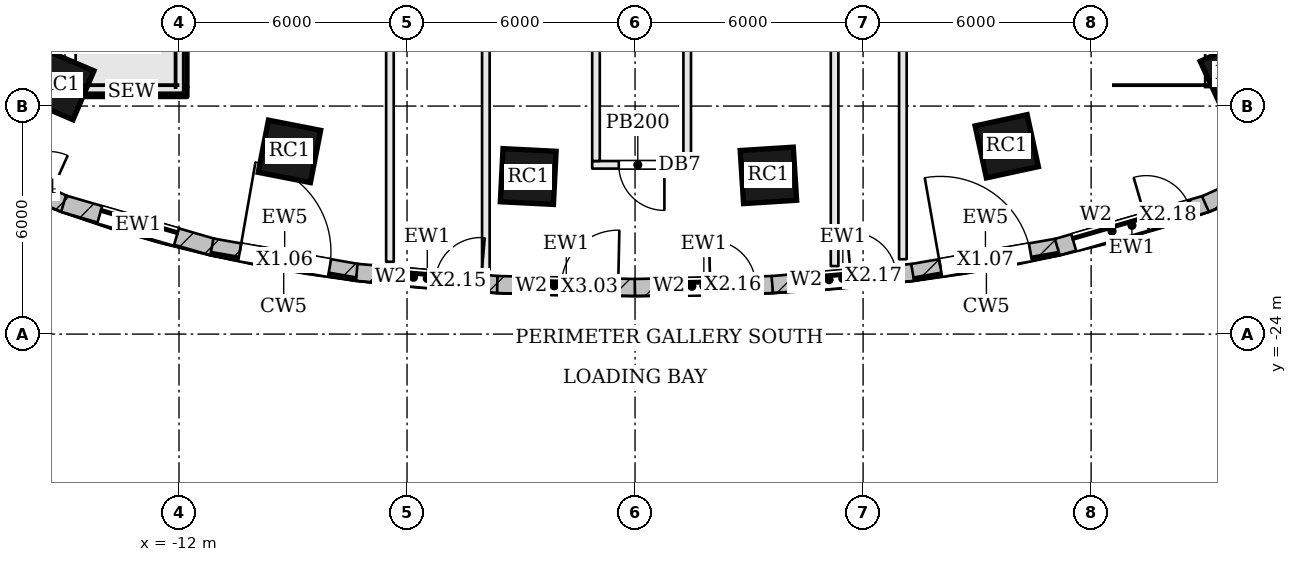
"""IFC4 building model, lengths in metres.
Left out: names, types, materials, properties, quantities, classifications, styles, units other than length and angle.
Written with IfcOpenShell. Run it as: python <this file> out.ifc"""

import sys

from ifc_helpers import new_model, si_unit, direction, frame, frame_2d, origin, origin_2d, place, context, subcontext, project, spatial, rectangle, extrude, element, fill, save


model = new_model("IFC4")
c1 = context("Model", 3, precision=1e-05, world=origin(), true_north=direction((0.0, 1.0)))
c2 = subcontext(c1, "Body", "Model", "MODEL_VIEW")
j1 = project(units=[si_unit("LENGTHUNIT", "METRE"), si_unit("PLANEANGLEUNIT", "RADIAN")], contexts=[c1])
p1 = place(None, origin())
s1 = spatial("IfcSite", under=j1, at=p1, CompositionType="ELEMENT")
p2 = place(p1, origin())
s2 = spatial("IfcBuilding", under=s1, at=p2, CompositionType="ELEMENT")
p3 = place(p2, origin())
s3 = spatial("IfcBuildingStorey", under=s2, at=p3, CompositionType="ELEMENT", Elevation=0.0)
for number, where, z_axis, x_axis in (
    (1, (-15.157, -17.441, 0.0), (0.0, 0.0, 1.0), (0.919, -0.394, 0.0)),
    (2, (-9.094, -19.192, 0.0), (0.0, 0.0, 1.0), (0.981, -0.192, 0.0)),
    (3, (-2.811, -19.854, 0.0), (0.0, 0.0, 1.0), (0.999, -0.05, 0.0)),
    (4, (3.509, -19.824, 0.0), (0.0, 0.0, 1.0), (0.998, 0.063, 0.0)),
    (5, (9.78, -19.058, 0.0), (0.0, 0.0, 1.0), (0.977, 0.211, 0.0)),
    (6, (15.799, -17.165, 0.0), (0.0, 0.0, 1.0), (0.908, 0.419, 0.0)),
):
    element("IfcColumn", number, at=place(p3, frame(where, z_axis=z_axis, x_axis=x_axis)), inside=s3, PredefinedType="COLUMN", context=c2, shape_type="SweptSolid", body=[
        extrude(rectangle(XDim=1.4, YDim=1.4, at=origin_2d()), origin(), (0.0, 0.0, 1.0), 7.2),
    ])
p4 = place(p3, frame((-18.934, -18.821, 0.0), z_axis=(0.0, 0.0, 1.0), x_axis=(0.912571415594, -0.408917365052, 0.0)))
e7 = element("IfcWall", 7, at=p4, inside=s3, PredefinedType="SOLIDWALL", context=c2, shape_type="SweptSolid", body=[
    extrude(rectangle(XDim=4.301, YDim=0.45, at=frame_2d((2.15, 0.0))), origin(), (0.0, 0.0, 1.0), 6.95),
])
p5 = place(p4, frame((0.45, 0.0, 0.9)))
e8 = element("IfcOpeningElement", 8, at=p5, cuts=e7, PredefinedType="OPENING", context=c2, shape_type="SweptSolid", body=[
    extrude(rectangle(XDim=2.1, YDim=5.0, at=frame_2d((1.05, 2.5))), frame((0.0, 0.235, 0.0), z_axis=(0.0, -1.0, 0.0), x_axis=(1.0, 0.0, 0.0)), (0.0, 0.0, 1.0), 0.47),
])
p6 = place(p4, frame((2.651, 0.0, 0.0)))
e9 = element("IfcOpeningElement", 9, at=p6, cuts=e7, PredefinedType="OPENING", context=c2, shape_type="SweptSolid", body=[
    extrude(rectangle(XDim=1.2, YDim=2.4, at=frame_2d((0.6, 1.2))), frame((0.0, 0.235, 0.0), z_axis=(0.0, -1.0, 0.0), x_axis=(1.0, 0.0, 0.0)), (0.0, 0.0, 1.0), 0.47),
])
p7 = place(p3, frame((-15.038, -20.569, 0.0), z_axis=(0.0, 0.0, 1.0), x_axis=(0.960186274122, -0.279360553743, 0.0)))
e10 = element("IfcWall", 10, at=p7, inside=s3, PredefinedType="SOLIDWALL", context=c2, shape_type="SweptSolid", body=[
    extrude(rectangle(XDim=4.091, YDim=0.45, at=frame_2d((2.045, 0.0))), origin(), (0.0, 0.0, 1.0), 6.95),
])
p8 = place(p7, frame((0.996, 0.0, 0.9)))
e11 = element("IfcOpeningElement", 11, at=p8, cuts=e10, PredefinedType="OPENING", context=c2, shape_type="SweptSolid", body=[
    extrude(rectangle(XDim=2.1, YDim=5.0, at=frame_2d((1.05, 2.5))), frame((0.0, 0.235, 0.0), z_axis=(0.0, -1.0, 0.0), x_axis=(1.0, 0.0, 0.0)), (0.0, 0.0, 1.0), 0.47),
])
p9 = place(p3, frame((-11.134, -21.706, 0.0), z_axis=(0.0, 0.0, 1.0), x_axis=(0.984947461591, -0.172853978566, 0.0)))
e12 = element("IfcWall", 12, at=p9, inside=s3, PredefinedType="SOLIDWALL", context=c2, shape_type="SweptSolid", body=[
    extrude(rectangle(XDim=3.888, YDim=0.45, at=frame_2d((1.944, 0.0))), origin(), (0.0, 0.0, 1.0), 3.55),
])
p10 = place(p9, frame((0.744, 0.0, 0.0)))
e13 = element("IfcOpeningElement", 13, at=p10, cuts=e12, PredefinedType="OPENING", context=c2, shape_type="SweptSolid", body=[
    extrude(rectangle(XDim=2.4, YDim=3.2, at=frame_2d((1.2, 1.6))), frame((0.0, 0.235, 0.0), z_axis=(0.0, -1.0, 0.0), x_axis=(1.0, 0.0, 0.0)), (0.0, 0.0, 1.0), 0.47),
])
p11 = place(p3, frame((-7.323, -22.376, 0.0), z_axis=(0.0, 0.0, 1.0), x_axis=(0.996259982326, -0.086406293838, 0.0)))
e14 = element("IfcWall", 14, at=p11, inside=s3, PredefinedType="SOLIDWALL", context=c2, shape_type="SweptSolid", body=[
    extrude(rectangle(XDim=3.727, YDim=0.45, at=frame_2d((1.863, 0.0))), origin(), (0.0, 0.0, 1.0), 6.95),
])
p12 = place(p11, frame((0.45, 0.0, 0.9)))
e15 = element("IfcOpeningElement", 15, at=p12, cuts=e14, PredefinedType="OPENING", context=c2, shape_type="SweptSolid", body=[
    extrude(rectangle(XDim=2.1, YDim=5.0, at=frame_2d((1.05, 2.5))), frame((0.0, 0.235, 0.0), z_axis=(0.0, -1.0, 0.0), x_axis=(1.0, 0.0, 0.0)), (0.0, 0.0, 1.0), 0.47),
])
p13 = place(p11, frame((2.077, 0.0, 0.0)))
e16 = element("IfcOpeningElement", 16, at=p13, cuts=e14, PredefinedType="OPENING", context=c2, shape_type="SweptSolid", body=[
    extrude(rectangle(XDim=1.2, YDim=2.4, at=frame_2d((0.6, 1.2))), frame((0.0, 0.235, 0.0), z_axis=(0.0, -1.0, 0.0), x_axis=(1.0, 0.0, 0.0)), (0.0, 0.0, 1.0), 0.47),
])
p14 = place(p3, frame((-3.625, -22.697, 0.0), z_axis=(0.0, 0.0, 1.0), x_axis=(0.999769941673, -0.0214490962, 0.0)))
e17 = element("IfcWall", 17, at=p14, inside=s3, PredefinedType="SOLIDWALL", context=c2, shape_type="SweptSolid", body=[
    extrude(rectangle(XDim=3.631, YDim=0.45, at=frame_2d((1.815, 0.0))), origin(), (0.0, 0.0, 1.0), 6.95),
])
p15 = place(p14, frame((0.45, 0.0, 0.9)))
e18 = element("IfcOpeningElement", 18, at=p15, cuts=e17, PredefinedType="OPENING", context=c2, shape_type="SweptSolid", body=[
    extrude(rectangle(XDim=2.1, YDim=5.0, at=frame_2d((1.05, 2.5))), frame((0.0, 0.235, 0.0), z_axis=(0.0, -1.0, 0.0), x_axis=(1.0, 0.0, 0.0)), (0.0, 0.0, 1.0), 0.47),
])
p16 = place(p14, frame((1.681, 0.0, 0.0)))
e19 = element("IfcOpeningElement", 19, at=p16, cuts=e17, PredefinedType="OPENING", context=c2, shape_type="SweptSolid", body=[
    extrude(rectangle(XDim=1.5, YDim=2.4, at=frame_2d((0.75, 1.2))), frame((0.0, 0.235, 0.0), z_axis=(0.0, -1.0, 0.0), x_axis=(1.0, 0.0, 0.0)), (0.0, 0.0, 1.0), 0.47),
])
p17 = place(p3, frame((-0.005, -22.775, 0.0), z_axis=(0.0, 0.0, 1.0), x_axis=(0.999769941673, 0.0214490962, 0.0)))
e20 = element("IfcWall", 20, at=p17, inside=s3, PredefinedType="SOLIDWALL", context=c2, shape_type="SweptSolid", body=[
    extrude(rectangle(XDim=3.631, YDim=0.45, at=frame_2d((1.815, 0.0))), origin(), (0.0, 0.0, 1.0), 6.95),
])
p18 = place(p17, frame((0.45, 0.0, 0.9)))
e21 = element("IfcOpeningElement", 21, at=p18, cuts=e20, PredefinedType="OPENING", context=c2, shape_type="SweptSolid", body=[
    extrude(rectangle(XDim=2.1, YDim=5.0, at=frame_2d((1.05, 2.5))), frame((0.0, 0.235, 0.0), z_axis=(0.0, -1.0, 0.0), x_axis=(1.0, 0.0, 0.0)), (0.0, 0.0, 1.0), 0.47),
])
p19 = place(p17, frame((1.981, 0.0, 0.0)))
e22 = element("IfcOpeningElement", 22, at=p19, cuts=e20, PredefinedType="OPENING", context=c2, shape_type="SweptSolid", body=[
    extrude(rectangle(XDim=1.2, YDim=2.4, at=frame_2d((0.6, 1.2))), frame((0.0, 0.235, 0.0), z_axis=(0.0, -1.0, 0.0), x_axis=(1.0, 0.0, 0.0)), (0.0, 0.0, 1.0), 0.47),
])
p20 = place(p3, frame((3.611, -22.698, 0.0), z_axis=(0.0, 0.0, 1.0), x_axis=(0.996259982326, 0.086406293838, 0.0)))
e23 = element("IfcWall", 23, at=p20, inside=s3, PredefinedType="SOLIDWALL", context=c2, shape_type="SweptSolid", body=[
    extrude(rectangle(XDim=3.727, YDim=0.45, at=frame_2d((1.863, 0.0))), origin(), (0.0, 0.0, 1.0), 6.95),
])
p21 = place(p20, frame((0.45, 0.0, 0.9)))
e24 = element("IfcOpeningElement", 24, at=p21, cuts=e23, PredefinedType="OPENING", context=c2, shape_type="SweptSolid", body=[
    extrude(rectangle(XDim=2.1, YDim=5.0, at=frame_2d((1.05, 2.5))), frame((0.0, 0.235, 0.0), z_axis=(0.0, -1.0, 0.0), x_axis=(1.0, 0.0, 0.0)), (0.0, 0.0, 1.0), 0.47),
])
p22 = place(p20, frame((2.077, 0.0, 0.0)))
e25 = element("IfcOpeningElement", 25, at=p22, cuts=e23, PredefinedType="OPENING", context=c2, shape_type="SweptSolid", body=[
    extrude(rectangle(XDim=1.2, YDim=2.4, at=frame_2d((0.6, 1.2))), frame((0.0, 0.235, 0.0), z_axis=(0.0, -1.0, 0.0), x_axis=(1.0, 0.0, 0.0)), (0.0, 0.0, 1.0), 0.47),
])
p23 = place(p3, frame((7.304, -22.378, 0.0), z_axis=(0.0, 0.0, 1.0), x_axis=(0.984947461591, 0.172853978566, 0.0)))
e26 = element("IfcWall", 26, at=p23, inside=s3, PredefinedType="SOLIDWALL", context=c2, shape_type="SweptSolid", body=[
    extrude(rectangle(XDim=3.888, YDim=0.45, at=frame_2d((1.944, 0.0))), origin(), (0.0, 0.0, 1.0), 3.55),
])
p24 = place(p23, frame((0.744, 0.0, 0.0)))
e27 = element("IfcOpeningElement", 27, at=p24, cuts=e26, PredefinedType="OPENING", context=c2, shape_type="SweptSolid", body=[
    extrude(rectangle(XDim=2.4, YDim=3.2, at=frame_2d((1.2, 1.6))), frame((0.0, 0.235, 0.0), z_axis=(0.0, -1.0, 0.0), x_axis=(1.0, 0.0, 0.0)), (0.0, 0.0, 1.0), 0.47),
])
p25 = place(p3, frame((11.11, -21.712, 0.0), z_axis=(0.0, 0.0, 1.0), x_axis=(0.960186274122, 0.279360553743, 0.0)))
e28 = element("IfcWall", 28, at=p25, inside=s3, PredefinedType="SOLIDWALL", context=c2, shape_type="SweptSolid", body=[
    extrude(rectangle(XDim=4.091, YDim=0.45, at=frame_2d((2.045, 0.0))), origin(), (0.0, 0.0, 1.0), 6.95),
])
p26 = place(p25, frame((0.45, 0.0, 0.9)))
e29 = element("IfcOpeningElement", 29, at=p26, cuts=e28, PredefinedType="OPENING", context=c2, shape_type="SweptSolid", body=[
    extrude(rectangle(XDim=2.1, YDim=5.0, at=frame_2d((1.05, 2.5))), frame((0.0, 0.235, 0.0), z_axis=(0.0, -1.0, 0.0), x_axis=(1.0, 0.0, 0.0)), (0.0, 0.0, 1.0), 0.47),
])
p27 = place(p25, frame((2.441, 0.0, 0.0)))
e30 = element("IfcOpeningElement", 30, at=p27, cuts=e28, PredefinedType="OPENING", context=c2, shape_type="SweptSolid", body=[
    extrude(rectangle(XDim=1.2, YDim=2.4, at=frame_2d((0.6, 1.2))), frame((0.0, 0.235, 0.0), z_axis=(0.0, -1.0, 0.0), x_axis=(1.0, 0.0, 0.0)), (0.0, 0.0, 1.0), 0.47),
])
p28 = place(p3, frame((15.009, -20.58, 0.0), z_axis=(0.0, 0.0, 1.0), x_axis=(0.912571415594, 0.408917365052, 0.0)))
e31 = element("IfcWall", 31, at=p28, inside=s3, PredefinedType="SOLIDWALL", context=c2, shape_type="SweptSolid", body=[
    extrude(rectangle(XDim=4.301, YDim=0.45, at=frame_2d((2.15, 0.0))), origin(), (0.0, 0.0, 1.0), 6.95),
])
p29 = place(p28, frame((1.101, 0.0, 0.9)))
e32 = element("IfcOpeningElement", 32, at=p29, cuts=e31, PredefinedType="OPENING", context=c2, shape_type="SweptSolid", body=[
    extrude(rectangle(XDim=2.1, YDim=5.0, at=frame_2d((1.05, 2.5))), frame((0.0, 0.235, 0.0), z_axis=(0.0, -1.0, 0.0), x_axis=(1.0, 0.0, 0.0)), (0.0, 0.0, 1.0), 0.47),
])
p30 = place(p3, frame((-3.926, -3.05, 0.0), z_axis=(0.0, 0.0, 1.0), x_axis=(0.0, -1.0, 0.0)))
e33 = element("IfcWall", 33, at=p30, inside=s3, PredefinedType="PARTITIONING", context=c2, shape_type="SweptSolid", body=[
    extrude(rectangle(XDim=19.252, YDim=0.2, at=frame_2d((9.626, 0.0))), origin(), (0.0, 0.0, 1.0), 6.23),
])
p31 = place(p30, frame((0.95, 0.0, 0.0)))
e34 = element("IfcOpeningElement", 34, at=p31, cuts=e33, PredefinedType="OPENING", context=c2, shape_type="SweptSolid", body=[
    extrude(rectangle(XDim=1.0, YDim=2.1, at=frame_2d((0.5, 1.05))), frame((0.0, 0.11, 0.0), z_axis=(0.0, -1.0, 0.0), x_axis=(1.0, 0.0, 0.0)), (0.0, 0.0, 1.0), 0.22),
])
p32 = place(p3, frame((-6.45, -22.097, 0.0), z_axis=(0.0, 0.0, 1.0), x_axis=(0.0, 1.0, 0.0)))
e35 = element("IfcWall", 35, at=p32, inside=s3, PredefinedType="PARTITIONING", context=c2, shape_type="SweptSolid", body=[
    extrude(rectangle(XDim=19.047, YDim=0.2, at=frame_2d((9.523, 0.0))), origin(), (0.0, 0.0, 1.0), 6.23),
])
p33 = place(p32, frame((17.097, 0.0, 0.0)))
e36 = element("IfcOpeningElement", 36, at=p33, cuts=e35, PredefinedType="OPENING", context=c2, shape_type="SweptSolid", body=[
    extrude(rectangle(XDim=1.0, YDim=2.1, at=frame_2d((0.5, 1.05))), frame((0.0, 0.11, 0.0), z_axis=(0.0, -1.0, 0.0), x_axis=(1.0, 0.0, 0.0)), (0.0, 0.0, 1.0), 0.22),
])
p34 = place(p3, frame((7.047, -3.05, 0.0), z_axis=(0.0, 0.0, 1.0), x_axis=(0.0, -1.0, 0.0)))
e37 = element("IfcWall", 37, at=p34, inside=s3, PredefinedType="PARTITIONING", context=c2, shape_type="SweptSolid", body=[
    extrude(rectangle(XDim=18.98, YDim=0.2, at=frame_2d((9.49, 0.0))), origin(), (0.0, 0.0, 1.0), 6.23),
])
p35 = place(p34, frame((0.95, 0.0, 0.0)))
e38 = element("IfcOpeningElement", 38, at=p35, cuts=e37, PredefinedType="OPENING", context=c2, shape_type="SweptSolid", body=[
    extrude(rectangle(XDim=1.0, YDim=2.1, at=frame_2d((0.5, 1.05))), frame((0.0, 0.11, 0.0), z_axis=(0.0, -1.0, 0.0), x_axis=(1.0, 0.0, 0.0)), (0.0, 0.0, 1.0), 0.22),
])
p36 = place(p3, frame((5.25, -22.21, 0.0), z_axis=(0.0, 0.0, 1.0), x_axis=(0.0, 1.0, 0.0)))
e39 = element("IfcWall", 39, at=p36, inside=s3, PredefinedType="PARTITIONING", context=c2, shape_type="SweptSolid", body=[
    extrude(rectangle(XDim=19.16, YDim=0.2, at=frame_2d((9.58, 0.0))), origin(), (0.0, 0.0, 1.0), 6.23),
])
p37 = place(p36, frame((17.21, 0.0, 0.0)))
e40 = element("IfcOpeningElement", 40, at=p37, cuts=e39, PredefinedType="OPENING", context=c2, shape_type="SweptSolid", body=[
    extrude(rectangle(XDim=1.0, YDim=2.1, at=frame_2d((0.5, 1.05))), frame((0.0, 0.11, 0.0), z_axis=(0.0, -1.0, 0.0), x_axis=(1.0, 0.0, 0.0)), (0.0, 0.0, 1.0), 0.22),
])
p38 = place(p3, frame((1.372, -6.1, 0.0), z_axis=(0.0, 0.0, 1.0), x_axis=(0.0, -1.0, 0.0)))
e41 = element("IfcWall", 41, at=p38, inside=s3, PredefinedType="PARTITIONING", context=c2, shape_type="SweptSolid", body=[
    extrude(rectangle(XDim=13.546, YDim=0.2, at=frame_2d((6.773, 0.0))), origin(), (0.0, 0.0, 1.0), 6.23),
])
p39 = place(p38, frame((5.717, 0.0, 0.0)))
e42 = element("IfcOpeningElement", 42, at=p39, cuts=e41, PredefinedType="OPENING", context=c2, shape_type="SweptSolid", body=[
    extrude(rectangle(XDim=1.2, YDim=2.1, at=frame_2d((0.6, 1.05))), frame((0.0, 0.11, 0.0), z_axis=(0.0, -1.0, 0.0), x_axis=(1.0, 0.0, 0.0)), (0.0, 0.0, 1.0), 0.22),
])
p40 = place(p3, frame((1.272, -19.546, 0.0), z_axis=(0.0, 0.0, 1.0), x_axis=(-1.0, 0.0, 0.0)))
e43 = element("IfcWall", 43, at=p40, inside=s3, PredefinedType="PARTITIONING", context=c2, shape_type="SweptSolid", body=[
    extrude(rectangle(XDim=2.4, YDim=0.2, at=frame_2d((1.2, 0.0))), origin(), (0.0, 0.0, 1.0), 6.23),
])
p41 = place(p40, frame((0.5, 0.0, 0.0)))
e44 = element("IfcOpeningElement", 44, at=p41, cuts=e43, PredefinedType="OPENING", context=c2, shape_type="SweptSolid", body=[
    extrude(rectangle(XDim=1.2, YDim=2.1, at=frame_2d((0.6, 1.05))), frame((0.0, 0.11, 0.0), z_axis=(0.0, -1.0, 0.0), x_axis=(1.0, 0.0, 0.0)), (0.0, 0.0, 1.0), 0.22),
])
p42 = place(p3, frame((-1.028, -19.446, 0.0), z_axis=(0.0, 0.0, 1.0), x_axis=(0.0, 1.0, 0.0)))
e45 = element("IfcWall", 45, at=p42, inside=s3, PredefinedType="PARTITIONING", context=c2, shape_type="SweptSolid", body=[
    extrude(rectangle(XDim=13.346, YDim=0.2, at=frame_2d((6.673, 0.0))), origin(), (0.0, 0.0, 1.0), 6.23),
])
p43 = place(p42, frame((6.423, 0.0, 0.0)))
e46 = element("IfcOpeningElement", 46, at=p43, cuts=e45, PredefinedType="OPENING", context=c2, shape_type="SweptSolid", body=[
    extrude(rectangle(XDim=1.2, YDim=2.1, at=frame_2d((0.6, 1.05))), frame((0.0, 0.11, 0.0), z_axis=(0.0, -1.0, 0.0), x_axis=(1.0, 0.0, 0.0)), (0.0, 0.0, 1.0), 0.22),
])
p44 = place(p3, frame((-11.915, -17.5, 0.0), z_axis=(0.0, 0.0, 1.0), x_axis=(0.0, 1.0, 0.0)))
e47 = element("IfcWall", 47, at=p44, inside=s3, PredefinedType="SOLIDWALL", context=c2, shape_type="SweptSolid", body=[
    extrude(rectangle(XDim=4.95, YDim=0.25, at=frame_2d((2.475, 0.0))), origin(), (0.0, 0.0, 1.0), 6.95),
])
p45 = place(p3, frame((-14.72, -17.625, 0.0), z_axis=(0.0, 0.0, 1.0), x_axis=(1.0, 0.0, 0.0)))
e48 = element("IfcWall", 48, at=p45, inside=s3, PredefinedType="SOLIDWALL", context=c2, shape_type="SweptSolid", body=[
    extrude(rectangle(XDim=2.93, YDim=0.25, at=frame_2d((1.465, 0.0))), origin(), (0.0, 0.0, 1.0), 6.95),
])
p46 = place(p8, origin())
e49 = element("IfcWindow", 49, at=p46, inside=s3, PartitioningType="SINGLE_PANEL", PredefinedType="WINDOW", context=c2, shape_type="SweptSolid", body=[
    extrude(rectangle(XDim=2.1, YDim=5.0, at=frame_2d((1.05, 2.5))), frame((0.0, 0.135, 0.0), z_axis=(0.0, -1.0, 0.0), x_axis=(1.0, 0.0, 0.0)), (0.0, 0.0, 1.0), 0.06),
])
fill(e11, e49)
p47 = place(p10, origin())
e50 = element("IfcDoor", 50, at=p47, inside=s3, OperationType="DOUBLE_DOOR_DOUBLE_SWING", PredefinedType="DOOR", context=c2, shape_type="SweptSolid", body=[
    extrude(rectangle(XDim=2.4, YDim=3.2, at=frame_2d((1.2, 1.6))), frame((0.0, 0.025, 0.0), z_axis=(0.0, -1.0, 0.0), x_axis=(1.0, 0.0, 0.0)), (0.0, 0.0, 1.0), 0.05),
])
fill(e13, e50)
p48 = place(p12, origin())
e51 = element("IfcWindow", 51, at=p48, inside=s3, PartitioningType="SINGLE_PANEL", PredefinedType="WINDOW", context=c2, shape_type="SweptSolid", body=[
    extrude(rectangle(XDim=2.1, YDim=5.0, at=frame_2d((1.05, 2.5))), frame((0.0, 0.135, 0.0), z_axis=(0.0, -1.0, 0.0), x_axis=(1.0, 0.0, 0.0)), (0.0, 0.0, 1.0), 0.06),
])
fill(e15, e51)
p49 = place(p13, frame((1.2, 0.0, 0.0), z_axis=(0.0, 0.0, 1.0), x_axis=(-1.0, 0.0, 0.0)))
e52 = element("IfcDoor", 52, at=p49, inside=s3, OperationType="SINGLE_SWING_RIGHT", PredefinedType="DOOR", context=c2, shape_type="SweptSolid", body=[
    extrude(rectangle(XDim=1.2, YDim=2.4, at=frame_2d((0.6, 1.2))), frame((0.0, 0.025, 0.0), z_axis=(0.0, -1.0, 0.0), x_axis=(1.0, 0.0, 0.0)), (0.0, 0.0, 1.0), 0.05),
])
fill(e16, e52)
p50 = place(p15, origin())
e53 = element("IfcWindow", 53, at=p50, inside=s3, PartitioningType="SINGLE_PANEL", PredefinedType="WINDOW", context=c2, shape_type="SweptSolid", body=[
    extrude(rectangle(XDim=2.1, YDim=5.0, at=frame_2d((1.05, 2.5))), frame((0.0, 0.135, 0.0), z_axis=(0.0, -1.0, 0.0), x_axis=(1.0, 0.0, 0.0)), (0.0, 0.0, 1.0), 0.06),
])
fill(e18, e53)
p51 = place(p16, frame((1.5, 0.0, 0.0), z_axis=(0.0, 0.0, 1.0), x_axis=(-1.0, 0.0, 0.0)))
e54 = element("IfcDoor", 54, at=p51, inside=s3, OperationType="SINGLE_SWING_RIGHT", PredefinedType="DOOR", context=c2, shape_type="SweptSolid", body=[
    extrude(rectangle(XDim=1.5, YDim=2.4, at=frame_2d((0.75, 1.2))), frame((0.0, 0.025, 0.0), z_axis=(0.0, -1.0, 0.0), x_axis=(1.0, 0.0, 0.0)), (0.0, 0.0, 1.0), 0.05),
])
fill(e19, e54)
p52 = place(p18, origin())
e55 = element("IfcWindow", 55, at=p52, inside=s3, PartitioningType="SINGLE_PANEL", PredefinedType="WINDOW", context=c2, shape_type="SweptSolid", body=[
    extrude(rectangle(XDim=2.1, YDim=5.0, at=frame_2d((1.05, 2.5))), frame((0.0, 0.135, 0.0), z_axis=(0.0, -1.0, 0.0), x_axis=(1.0, 0.0, 0.0)), (0.0, 0.0, 1.0), 0.06),
])
fill(e21, e55)
p53 = place(p19, frame((1.2, 0.0, 0.0), z_axis=(0.0, 0.0, 1.0), x_axis=(-1.0, 0.0, 0.0)))
e56 = element("IfcDoor", 56, at=p53, inside=s3, OperationType="SINGLE_SWING_LEFT", PredefinedType="DOOR", context=c2, shape_type="SweptSolid", body=[
    extrude(rectangle(XDim=1.2, YDim=2.4, at=frame_2d((0.6, 1.2))), frame((0.0, 0.025, 0.0), z_axis=(0.0, -1.0, 0.0), x_axis=(1.0, 0.0, 0.0)), (0.0, 0.0, 1.0), 0.05),
])
fill(e22, e56)
p54 = place(p21, origin())
e57 = element("IfcWindow", 57, at=p54, inside=s3, PartitioningType="SINGLE_PANEL", PredefinedType="WINDOW", context=c2, shape_type="SweptSolid", body=[
    extrude(rectangle(XDim=2.1, YDim=5.0, at=frame_2d((1.05, 2.5))), frame((0.0, 0.135, 0.0), z_axis=(0.0, -1.0, 0.0), x_axis=(1.0, 0.0, 0.0)), (0.0, 0.0, 1.0), 0.06),
])
fill(e24, e57)
p55 = place(p22, frame((1.2, 0.0, 0.0), z_axis=(0.0, 0.0, 1.0), x_axis=(-1.0, 0.0, 0.0)))
e58 = element("IfcDoor", 58, at=p55, inside=s3, OperationType="SINGLE_SWING_LEFT", PredefinedType="DOOR", context=c2, shape_type="SweptSolid", body=[
    extrude(rectangle(XDim=1.2, YDim=2.4, at=frame_2d((0.6, 1.2))), frame((0.0, 0.025, 0.0), z_axis=(0.0, -1.0, 0.0), x_axis=(1.0, 0.0, 0.0)), (0.0, 0.0, 1.0), 0.05),
])
fill(e25, e58)
p56 = place(p24, origin())
e59 = element("IfcDoor", 59, at=p56, inside=s3, OperationType="DOUBLE_DOOR_DOUBLE_SWING", PredefinedType="DOOR", context=c2, shape_type="SweptSolid", body=[
    extrude(rectangle(XDim=2.4, YDim=3.2, at=frame_2d((1.2, 1.6))), frame((0.0, 0.025, 0.0), z_axis=(0.0, -1.0, 0.0), x_axis=(1.0, 0.0, 0.0)), (0.0, 0.0, 1.0), 0.05),
])
fill(e27, e59)
p57 = place(p26, origin())
e60 = element("IfcWindow", 60, at=p57, inside=s3, PartitioningType="SINGLE_PANEL", PredefinedType="WINDOW", context=c2, shape_type="SweptSolid", body=[
    extrude(rectangle(XDim=2.1, YDim=5.0, at=frame_2d((1.05, 2.5))), frame((0.0, 0.135, 0.0), z_axis=(0.0, -1.0, 0.0), x_axis=(1.0, 0.0, 0.0)), (0.0, 0.0, 1.0), 0.06),
])
fill(e29, e60)
p58 = place(p27, frame((1.2, 0.0, 0.0), z_axis=(0.0, 0.0, 1.0), x_axis=(-1.0, 0.0, 0.0)))
e61 = element("IfcDoor", 61, at=p58, inside=s3, OperationType="SINGLE_SWING_LEFT", PredefinedType="DOOR", context=c2, shape_type="SweptSolid", body=[
    extrude(rectangle(XDim=1.2, YDim=2.4, at=frame_2d((0.6, 1.2))), frame((0.0, 0.025, 0.0), z_axis=(0.0, -1.0, 0.0), x_axis=(1.0, 0.0, 0.0)), (0.0, 0.0, 1.0), 0.05),
])
fill(e30, e61)
p59 = place(p41, origin())
e62 = element("IfcDoor", 62, at=p59, inside=s3, OperationType="SINGLE_SWING_LEFT", PredefinedType="DOOR", context=c2, shape_type="SweptSolid", body=[
    extrude(rectangle(XDim=1.2, YDim=2.1, at=frame_2d((0.6, 1.05))), frame((0.0, 0.025, 0.0), z_axis=(0.0, -1.0, 0.0), x_axis=(1.0, 0.0, 0.0)), (0.0, 0.0, 1.0), 0.05),
])
fill(e44, e62)
save(model, sys.argv[1])
